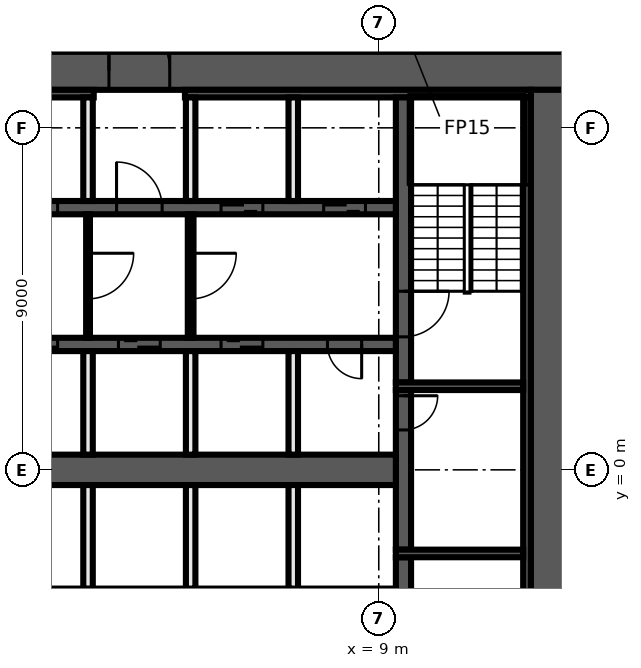
"""IFC4 building model, lengths in metres.
Left out: names, types, materials, properties, quantities, classifications, styles, units other than length and angle.
Written with IfcOpenShell. Run it as: python <this file> out.ifc"""

import sys

from ifc_helpers import new_model, si_unit, direction, frame, frame_2d, origin, place, context, subcontext, project, spatial, rectangle, extrude, element, fill, save


model = new_model("IFC4")
c1 = context("Model", 3, precision=1e-05, world=origin(), true_north=direction((0.0, 1.0)))
c2 = subcontext(c1, "Body", "Model", "MODEL_VIEW")
j1 = project(units=[si_unit("LENGTHUNIT", "METRE"), si_unit("PLANEANGLEUNIT", "RADIAN")], contexts=[c1])
p1 = place(None, origin())
s1 = spatial("IfcSite", under=j1, at=p1, CompositionType="ELEMENT")
p2 = place(p1, origin())
s2 = spatial("IfcBuilding", under=s1, at=p2, CompositionType="ELEMENT")
p3 = place(p2, frame((0.0, 0.0, 124.8)))
s3 = spatial("IfcBuildingStorey", under=s2, at=p3, CompositionType="ELEMENT", Elevation=124.8)
for number, where, z_axis, x_axis in (
    (1, (3.6, 11.0, 0.0), (0.0, 0.0, 1.0), (0.0, 1.0, 0.0)),
    (2, (1.8, 11.0, 0.0), (0.0, 0.0, 1.0), (0.0, 1.0, 0.0)),
):
    element("IfcWall", number, at=place(p3, frame(where, z_axis=z_axis, x_axis=x_axis)), inside=s3, PredefinedType="PARTITIONING", context=c2, shape_type="SweptSolid", body=[
        extrude(rectangle(XDim=1.175, YDim=0.15, at=frame_2d((0.587, 0.0))), origin(), (0.0, 0.0, 1.0), 3.3),
    ])
p4 = place(p3, frame((-14.0, 10.5, 0.0), z_axis=(0.0, 0.0, 1.0), x_axis=(1.0, 0.0, 0.0)))
e3 = element("IfcWall", 3, at=p4, inside=s3, PredefinedType="SHEAR", context=c2, shape_type="SweptSolid", body=[
    extrude(rectangle(XDim=28.0, YDim=1.0, at=frame_2d((14.0, 0.0))), origin(), (0.0, 0.0, 1.0), 3.3),
])
p5 = place(p4, frame((15.9, 0.0, 0.0)))
e4 = element("IfcOpeningElement", 4, at=p5, cuts=e3, PredefinedType="OPENING", context=c2, shape_type="SweptSolid", body=[
    extrude(rectangle(XDim=1.6, YDim=2.1, at=frame_2d((0.8, 1.05))), frame((0.0, 0.51, 0.0), z_axis=(0.0, -1.0, 0.0), x_axis=(1.0, 0.0, 0.0)), (0.0, 0.0, 1.0), 1.02),
])
p6 = place(p3, frame((13.5, 10.0, 0.0), z_axis=(0.0, 0.0, 1.0), x_axis=(0.0, -1.0, 0.0)))
e5 = element("IfcWall", 5, at=p6, inside=s3, PredefinedType="SHEAR", context=c2, shape_type="SweptSolid", body=[
    extrude(rectangle(XDim=20.0, YDim=1.0, at=frame_2d((10.0, 0.0))), origin(), (0.0, 0.0, 1.0), 3.3),
])
p7 = place(p3, frame((-13.0, 9.9, 0.0), z_axis=(0.0, 0.0, 1.0), x_axis=(1.0, 0.0, 0.0)))
e6 = element("IfcWall", 6, at=p7, inside=s3, PredefinedType="SHEAR", context=c2, shape_type="SweptSolid", body=[
    extrude(rectangle(XDim=14.5, YDim=0.2, at=frame_2d((7.25, 0.0))), origin(), (0.0, 0.0, 1.0), 3.3),
])
p8 = place(p3, frame((3.9, 9.9, 0.0), z_axis=(0.0, 0.0, 1.0), x_axis=(1.0, 0.0, 0.0)))
e7 = element("IfcWall", 7, at=p8, inside=s3, PredefinedType="SHEAR", context=c2, shape_type="SweptSolid", body=[
    extrude(rectangle(XDim=9.1, YDim=0.2, at=frame_2d((4.55, 0.0))), origin(), (0.0, 0.0, 1.0), 3.3),
])
p9 = place(p3, frame((12.9, 9.8, 0.0), z_axis=(0.0, 0.0, 1.0), x_axis=(0.0, -1.0, 0.0)))
e8 = element("IfcWall", 8, at=p9, inside=s3, PredefinedType="SHEAR", context=c2, shape_type="SweptSolid", body=[
    extrude(rectangle(XDim=19.6, YDim=0.2, at=frame_2d((9.8, 0.0))), origin(), (0.0, 0.0, 1.0), 3.3),
])
p10 = place(p3, frame((9.65, -2.3, 0.0), z_axis=(0.0, 0.0, 1.0), x_axis=(0.0, -1.0, 0.0)))
e9 = element("IfcWall", 9, at=p10, inside=s3, PredefinedType="SHEAR", context=c2, shape_type="SweptSolid", body=[
    extrude(rectangle(XDim=7.5, YDim=0.4, at=frame_2d((3.75, 0.0))), origin(), (0.0, 0.0, 1.0), 3.3),
])
p11 = place(p10, frame((1.2, 0.0, 0.0)))
e10 = element("IfcOpeningElement", 10, at=p11, cuts=e9, PredefinedType="OPENING", context=c2, shape_type="SweptSolid", body=[
    extrude(rectangle(XDim=1.2, YDim=2.1, at=frame_2d((0.6, 1.05))), frame((0.0, 0.21, 0.0), z_axis=(0.0, -1.0, 0.0), x_axis=(1.0, 0.0, 0.0)), (0.0, 0.0, 1.0), 0.42),
])
p12 = place(p3, frame((9.65, 2.1, 0.0), z_axis=(0.0, 0.0, 1.0), x_axis=(0.0, -1.0, 0.0)))
e11 = element("IfcWall", 11, at=p12, inside=s3, PredefinedType="SHEAR", context=c2, shape_type="SweptSolid", body=[
    extrude(rectangle(XDim=4.2, YDim=0.4, at=frame_2d((2.1, 0.0))), origin(), (0.0, 0.0, 1.0), 3.3),
])
p13 = place(p12, frame((0.15, 0.0, 0.0)))
e12 = element("IfcOpeningElement", 12, at=p13, cuts=e11, PredefinedType="OPENING", context=c2, shape_type="SweptSolid", body=[
    extrude(rectangle(XDim=0.9, YDim=2.1, at=frame_2d((0.45, 1.05))), frame((0.0, 0.21, 0.0), z_axis=(0.0, -1.0, 0.0), x_axis=(1.0, 0.0, 0.0)), (0.0, 0.0, 1.0), 0.42),
])
p14 = place(p3, frame((9.65, 9.8, 0.0), z_axis=(0.0, 0.0, 1.0), x_axis=(0.0, -1.0, 0.0)))
e13 = element("IfcWall", 13, at=p14, inside=s3, PredefinedType="SHEAR", context=c2, shape_type="SweptSolid", body=[
    extrude(rectangle(XDim=7.5, YDim=0.4, at=frame_2d((3.75, 0.0))), origin(), (0.0, 0.0, 1.0), 3.3),
])
p15 = place(p14, frame((5.1, 0.0, 0.0)))
e14 = element("IfcOpeningElement", 14, at=p15, cuts=e13, PredefinedType="OPENING", context=c2, shape_type="SweptSolid", body=[
    extrude(rectangle(XDim=1.2, YDim=2.1, at=frame_2d((0.6, 1.05))), frame((0.0, 0.21, 0.0), z_axis=(0.0, -1.0, 0.0), x_axis=(1.0, 0.0, 0.0)), (0.0, 0.0, 1.0), 0.42),
])
for number, where, z_axis, x_axis in (
    (15, (9.45, 2.2, 0.0), (0.0, 0.0, 1.0), (1.0, 0.0, 0.0)),
    (16, (9.45, -2.2, 0.0), (0.0, 0.0, 1.0), (1.0, 0.0, 0.0)),
):
    element("IfcWall", number, at=place(p3, frame(where, z_axis=z_axis, x_axis=x_axis)), inside=s3, PredefinedType="SHEAR", context=c2, shape_type="SweptSolid", body=[
        extrude(rectangle(XDim=3.35, YDim=0.2, at=frame_2d((1.675, 0.0))), origin(), (0.0, 0.0, 1.0), 3.3),
    ])
p16 = place(p3, frame((-9.45, 6.9, 0.0), z_axis=(0.0, 0.0, 1.0), x_axis=(1.0, 0.0, 0.0)))
e17 = element("IfcWall", 17, at=p16, inside=s3, PredefinedType="SHEAR", context=c2, shape_type="SweptSolid", body=[
    extrude(rectangle(XDim=18.9, YDim=0.35, at=frame_2d((9.45, 0.0))), origin(), (0.0, 0.0, 1.0), 3.3),
])
p17 = place(p16, frame((0.8, 0.0, 0.0)))
e18 = element("IfcOpeningElement", 18, at=p17, cuts=e17, PredefinedType="OPENING", context=c2, shape_type="SweptSolid", body=[
    extrude(rectangle(XDim=1.1, YDim=2.1, at=frame_2d((0.55, 1.05))), frame((0.0, 0.185, 0.0), z_axis=(0.0, -1.0, 0.0), x_axis=(1.0, 0.0, 0.0)), (0.0, 0.0, 1.0), 0.37),
])
p18 = place(p16, frame((3.5, 0.0, 0.0)))
e19 = element("IfcOpeningElement", 19, at=p18, cuts=e17, PredefinedType="OPENING", context=c2, shape_type="SweptSolid", body=[
    extrude(rectangle(XDim=1.1, YDim=2.1, at=frame_2d((0.55, 1.05))), frame((0.0, 0.185, 0.0), z_axis=(0.0, -1.0, 0.0), x_axis=(1.0, 0.0, 0.0)), (0.0, 0.0, 1.0), 0.37),
])
p19 = place(p16, frame((6.2, 0.0, 0.0)))
e20 = element("IfcOpeningElement", 20, at=p19, cuts=e17, PredefinedType="OPENING", context=c2, shape_type="SweptSolid", body=[
    extrude(rectangle(XDim=1.1, YDim=2.1, at=frame_2d((0.55, 1.05))), frame((0.0, 0.185, 0.0), z_axis=(0.0, -1.0, 0.0), x_axis=(1.0, 0.0, 0.0)), (0.0, 0.0, 1.0), 0.37),
])
p20 = place(p16, frame((8.9, 0.0, 0.0)))
e21 = element("IfcOpeningElement", 21, at=p20, cuts=e17, PredefinedType="OPENING", context=c2, shape_type="SweptSolid", body=[
    extrude(rectangle(XDim=1.1, YDim=2.1, at=frame_2d((0.55, 1.05))), frame((0.0, 0.185, 0.0), z_axis=(0.0, -1.0, 0.0), x_axis=(1.0, 0.0, 0.0)), (0.0, 0.0, 1.0), 0.37),
])
p21 = place(p16, frame((11.55, 0.0, 0.0)))
e22 = element("IfcOpeningElement", 22, at=p21, cuts=e17, PredefinedType="OPENING", context=c2, shape_type="SweptSolid", body=[
    extrude(rectangle(XDim=1.2, YDim=2.1, at=frame_2d((0.6, 1.05))), frame((0.0, 0.185, 0.0), z_axis=(0.0, -1.0, 0.0), x_axis=(1.0, 0.0, 0.0)), (0.0, 0.0, 1.0), 0.37),
])
p22 = place(p16, frame((14.3, 0.0, 0.0)))
e23 = element("IfcOpeningElement", 23, at=p22, cuts=e17, PredefinedType="OPENING", context=c2, shape_type="SweptSolid", body=[
    extrude(rectangle(XDim=1.1, YDim=2.1, at=frame_2d((0.55, 1.05))), frame((0.0, 0.185, 0.0), z_axis=(0.0, -1.0, 0.0), x_axis=(1.0, 0.0, 0.0)), (0.0, 0.0, 1.0), 0.37),
])
p23 = place(p16, frame((17.0, 0.0, 0.0)))
e24 = element("IfcOpeningElement", 24, at=p23, cuts=e17, PredefinedType="OPENING", context=c2, shape_type="SweptSolid", body=[
    extrude(rectangle(XDim=1.1, YDim=2.1, at=frame_2d((0.55, 1.05))), frame((0.0, 0.185, 0.0), z_axis=(0.0, -1.0, 0.0), x_axis=(1.0, 0.0, 0.0)), (0.0, 0.0, 1.0), 0.37),
])
p24 = place(p3, frame((9.45, 3.3, 0.0), z_axis=(0.0, 0.0, 1.0), x_axis=(-1.0, 0.0, 0.0)))
e25 = element("IfcWall", 25, at=p24, inside=s3, PredefinedType="SHEAR", context=c2, shape_type="SweptSolid", body=[
    extrude(rectangle(XDim=18.9, YDim=0.35, at=frame_2d((9.45, 0.0))), origin(), (0.0, 0.0, 1.0), 3.3),
])
p25 = place(p24, frame((17.0, 0.0, 0.0)))
e26 = element("IfcOpeningElement", 26, at=p25, cuts=e25, PredefinedType="OPENING", context=c2, shape_type="SweptSolid", body=[
    extrude(rectangle(XDim=1.1, YDim=2.1, at=frame_2d((0.55, 1.05))), frame((0.0, 0.185, 0.0), z_axis=(0.0, -1.0, 0.0), x_axis=(1.0, 0.0, 0.0)), (0.0, 0.0, 1.0), 0.37),
])
p26 = place(p24, frame((14.3, 0.0, 0.0)))
e27 = element("IfcOpeningElement", 27, at=p26, cuts=e25, PredefinedType="OPENING", context=c2, shape_type="SweptSolid", body=[
    extrude(rectangle(XDim=1.1, YDim=2.1, at=frame_2d((0.55, 1.05))), frame((0.0, 0.185, 0.0), z_axis=(0.0, -1.0, 0.0), x_axis=(1.0, 0.0, 0.0)), (0.0, 0.0, 1.0), 0.37),
])
p27 = place(p24, frame((11.6, 0.0, 0.0)))
e28 = element("IfcOpeningElement", 28, at=p27, cuts=e25, PredefinedType="OPENING", context=c2, shape_type="SweptSolid", body=[
    extrude(rectangle(XDim=1.1, YDim=2.1, at=frame_2d((0.55, 1.05))), frame((0.0, 0.185, 0.0), z_axis=(0.0, -1.0, 0.0), x_axis=(1.0, 0.0, 0.0)), (0.0, 0.0, 1.0), 0.37),
])
p28 = place(p24, frame((8.9, 0.0, 0.0)))
e29 = element("IfcOpeningElement", 29, at=p28, cuts=e25, PredefinedType="OPENING", context=c2, shape_type="SweptSolid", body=[
    extrude(rectangle(XDim=1.1, YDim=2.1, at=frame_2d((0.55, 1.05))), frame((0.0, 0.185, 0.0), z_axis=(0.0, -1.0, 0.0), x_axis=(1.0, 0.0, 0.0)), (0.0, 0.0, 1.0), 0.37),
])
p29 = place(p24, frame((6.2, 0.0, 0.0)))
e30 = element("IfcOpeningElement", 30, at=p29, cuts=e25, PredefinedType="OPENING", context=c2, shape_type="SweptSolid", body=[
    extrude(rectangle(XDim=1.1, YDim=2.1, at=frame_2d((0.55, 1.05))), frame((0.0, 0.185, 0.0), z_axis=(0.0, -1.0, 0.0), x_axis=(1.0, 0.0, 0.0)), (0.0, 0.0, 1.0), 0.37),
])
p30 = place(p24, frame((3.5, 0.0, 0.0)))
e31 = element("IfcOpeningElement", 31, at=p30, cuts=e25, PredefinedType="OPENING", context=c2, shape_type="SweptSolid", body=[
    extrude(rectangle(XDim=1.1, YDim=2.1, at=frame_2d((0.55, 1.05))), frame((0.0, 0.185, 0.0), z_axis=(0.0, -1.0, 0.0), x_axis=(1.0, 0.0, 0.0)), (0.0, 0.0, 1.0), 0.37),
])
p31 = place(p24, frame((0.9, 0.0, 0.0)))
e32 = element("IfcOpeningElement", 32, at=p31, cuts=e25, PredefinedType="OPENING", context=c2, shape_type="SweptSolid", body=[
    extrude(rectangle(XDim=0.9, YDim=2.1, at=frame_2d((0.45, 1.05))), frame((0.0, 0.185, 0.0), z_axis=(0.0, -1.0, 0.0), x_axis=(1.0, 0.0, 0.0)), (0.0, 0.0, 1.0), 0.37),
])
p32 = place(p3, frame((-9.45, 0.0, 0.0), z_axis=(0.0, 0.0, 1.0), x_axis=(1.0, 0.0, 0.0)))
e33 = element("IfcWall", 33, at=p32, inside=s3, PredefinedType="SHEAR", context=c2, shape_type="SweptSolid", body=[
    extrude(rectangle(XDim=18.9, YDim=0.8, at=frame_2d((9.45, 0.0))), origin(), (0.0, 0.0, 1.0), 3.3),
])
for number, where, z_axis, x_axis in (
    (34, (6.75, -3.125, 0.0), (0.0, 0.0, 1.0), (0.0, 1.0, 0.0)),
    (35, (6.75, 0.4, 0.0), (0.0, 0.0, 1.0), (0.0, 1.0, 0.0)),
    (36, (6.75, 7.075, 0.0), (0.0, 0.0, 1.0), (0.0, 1.0, 0.0)),
):
    element("IfcWall", number, at=place(p3, frame(where, z_axis=z_axis, x_axis=x_axis)), inside=s3, PredefinedType="SOLIDWALL", context=c2, shape_type="SweptSolid", body=[
        extrude(rectangle(XDim=2.725, YDim=0.25, at=frame_2d((1.363, 0.0))), origin(), (0.0, 0.0, 1.0), 3.3),
    ])
p33 = place(p3, frame((4.05, 6.725, 0.0), z_axis=(0.0, 0.0, 1.0), x_axis=(0.0, -1.0, 0.0)))
e37 = element("IfcWall", 37, at=p33, inside=s3, PredefinedType="PARTITIONING", context=c2, shape_type="SweptSolid", body=[
    extrude(rectangle(XDim=3.25, YDim=0.15, at=frame_2d((1.625, 0.0))), origin(), (0.0, 0.0, 1.0), 3.3),
])
p34 = place(p33, frame((1.025, 0.0, 0.0)))
e38 = element("IfcOpeningElement", 38, at=p34, cuts=e37, PredefinedType="OPENING", context=c2, shape_type="SweptSolid", body=[
    extrude(rectangle(XDim=1.2, YDim=2.1, at=frame_2d((0.6, 1.05))), frame((0.0, 0.085, 0.0), z_axis=(0.0, -1.0, 0.0), x_axis=(1.0, 0.0, 0.0)), (0.0, 0.0, 1.0), 0.17),
])
for number, where, z_axis, x_axis in (
    (39, (4.05, -3.125, 0.0), (0.0, 0.0, 1.0), (0.0, 1.0, 0.0)),
    (40, (4.05, 0.4, 0.0), (0.0, 0.0, 1.0), (0.0, 1.0, 0.0)),
    (41, (4.05, 7.075, 0.0), (0.0, 0.0, 1.0), (0.0, 1.0, 0.0)),
):
    element("IfcWall", number, at=place(p3, frame(where, z_axis=z_axis, x_axis=x_axis)), inside=s3, PredefinedType="SOLIDWALL", context=c2, shape_type="SweptSolid", body=[
        extrude(rectangle(XDim=2.725, YDim=0.25, at=frame_2d((1.363, 0.0))), origin(), (0.0, 0.0, 1.0), 3.3),
    ])
p35 = place(p3, frame((1.35, 6.725, 0.0), z_axis=(0.0, 0.0, 1.0), x_axis=(0.0, -1.0, 0.0)))
e42 = element("IfcWall", 42, at=p35, inside=s3, PredefinedType="PARTITIONING", context=c2, shape_type="SweptSolid", body=[
    extrude(rectangle(XDim=3.25, YDim=0.1, at=frame_2d((1.625, 0.0))), origin(), (0.0, 0.0, 1.0), 3.3),
])
p36 = place(p35, frame((1.025, 0.0, 0.0)))
e43 = element("IfcOpeningElement", 43, at=p36, cuts=e42, PredefinedType="OPENING", context=c2, shape_type="SweptSolid", body=[
    extrude(rectangle(XDim=1.2, YDim=2.1, at=frame_2d((0.6, 1.05))), frame((0.0, 0.06, 0.0), z_axis=(0.0, -1.0, 0.0), x_axis=(1.0, 0.0, 0.0)), (0.0, 0.0, 1.0), 0.12),
])
for number, where, z_axis, x_axis in (
    (44, (1.35, -3.125, 0.0), (0.0, 0.0, 1.0), (0.0, 1.0, 0.0)),
    (45, (1.35, 0.4, 0.0), (0.0, 0.0, 1.0), (0.0, 1.0, 0.0)),
    (46, (1.35, 7.075, 0.0), (0.0, 0.0, 1.0), (0.0, 1.0, 0.0)),
):
    element("IfcWall", number, at=place(p3, frame(where, z_axis=z_axis, x_axis=x_axis)), inside=s3, PredefinedType="SOLIDWALL", context=c2, shape_type="SweptSolid", body=[
        extrude(rectangle(XDim=2.725, YDim=0.25, at=frame_2d((1.363, 0.0))), origin(), (0.0, 0.0, 1.0), 3.3),
    ])
p37 = place(p13, origin())
e47 = element("IfcDoor", 47, at=p37, inside=s3, OperationType="SINGLE_SWING_RIGHT", PredefinedType="DOOR", context=c2, shape_type="SweptSolid", body=[
    extrude(rectangle(XDim=0.9, YDim=2.1, at=frame_2d((0.45, 1.05))), frame((0.0, 0.025, 0.0), z_axis=(0.0, -1.0, 0.0), x_axis=(1.0, 0.0, 0.0)), (0.0, 0.0, 1.0), 0.05),
])
fill(e12, e47)
p38 = place(p20, origin())
e48 = element("IfcDoor", 48, at=p38, inside=s3, OperationType="DOUBLE_DOOR_SLIDING", PredefinedType="DOOR", context=c2, shape_type="SweptSolid", body=[
    extrude(rectangle(XDim=1.1, YDim=2.1, at=frame_2d((0.55, 1.05))), frame((0.0, 0.025, 0.0), z_axis=(0.0, -1.0, 0.0), x_axis=(1.0, 0.0, 0.0)), (0.0, 0.0, 1.0), 0.05),
])
fill(e21, e48)
p39 = place(p5, origin())
e49 = element("IfcDoor", 49, at=p39, inside=s3, OperationType="DOUBLE_DOOR_SINGLE_SWING", PredefinedType="DOOR", context=c2, shape_type="SweptSolid", body=[
    extrude(rectangle(XDim=1.6, YDim=2.1, at=frame_2d((0.8, 1.05))), frame((0.0, 0.025, 0.0), z_axis=(0.0, -1.0, 0.0), x_axis=(1.0, 0.0, 0.0)), (0.0, 0.0, 1.0), 0.05),
])
fill(e4, e49)
p40 = place(p21, origin())
e50 = element("IfcDoor", 50, at=p40, inside=s3, OperationType="SINGLE_SWING_LEFT", PredefinedType="DOOR", context=c2, shape_type="SweptSolid", body=[
    extrude(rectangle(XDim=1.2, YDim=2.1, at=frame_2d((0.6, 1.05))), frame((0.0, 0.025, 0.0), z_axis=(0.0, -1.0, 0.0), x_axis=(1.0, 0.0, 0.0)), (0.0, 0.0, 1.0), 0.05),
])
fill(e22, e50)
p41 = place(p22, origin())
e51 = element("IfcDoor", 51, at=p41, inside=s3, OperationType="DOUBLE_DOOR_SLIDING", PredefinedType="DOOR", context=c2, shape_type="SweptSolid", body=[
    extrude(rectangle(XDim=1.1, YDim=2.1, at=frame_2d((0.55, 1.05))), frame((0.0, 0.025, 0.0), z_axis=(0.0, -1.0, 0.0), x_axis=(1.0, 0.0, 0.0)), (0.0, 0.0, 1.0), 0.05),
])
fill(e23, e51)
p42 = place(p23, origin())
e52 = element("IfcDoor", 52, at=p42, inside=s3, OperationType="DOUBLE_DOOR_SLIDING", PredefinedType="DOOR", context=c2, shape_type="SweptSolid", body=[
    extrude(rectangle(XDim=1.1, YDim=2.1, at=frame_2d((0.55, 1.05))), frame((0.0, 0.025, 0.0), z_axis=(0.0, -1.0, 0.0), x_axis=(1.0, 0.0, 0.0)), (0.0, 0.0, 1.0), 0.05),
])
fill(e24, e52)
p43 = place(p28, origin())
e53 = element("IfcDoor", 53, at=p43, inside=s3, OperationType="DOUBLE_DOOR_SLIDING", PredefinedType="DOOR", context=c2, shape_type="SweptSolid", body=[
    extrude(rectangle(XDim=1.1, YDim=2.1, at=frame_2d((0.55, 1.05))), frame((0.0, 0.025, 0.0), z_axis=(0.0, -1.0, 0.0), x_axis=(1.0, 0.0, 0.0)), (0.0, 0.0, 1.0), 0.05),
])
fill(e29, e53)
p44 = place(p29, origin())
e54 = element("IfcDoor", 54, at=p44, inside=s3, OperationType="DOUBLE_DOOR_SLIDING", PredefinedType="DOOR", context=c2, shape_type="SweptSolid", body=[
    extrude(rectangle(XDim=1.1, YDim=2.1, at=frame_2d((0.55, 1.05))), frame((0.0, 0.025, 0.0), z_axis=(0.0, -1.0, 0.0), x_axis=(1.0, 0.0, 0.0)), (0.0, 0.0, 1.0), 0.05),
])
fill(e30, e54)
p45 = place(p30, origin())
e55 = element("IfcDoor", 55, at=p45, inside=s3, OperationType="DOUBLE_DOOR_SLIDING", PredefinedType="DOOR", context=c2, shape_type="SweptSolid", body=[
    extrude(rectangle(XDim=1.1, YDim=2.1, at=frame_2d((0.55, 1.05))), frame((0.0, 0.025, 0.0), z_axis=(0.0, -1.0, 0.0), x_axis=(1.0, 0.0, 0.0)), (0.0, 0.0, 1.0), 0.05),
])
fill(e31, e55)
p46 = place(p31, origin())
e56 = element("IfcDoor", 56, at=p46, inside=s3, OperationType="SINGLE_SWING_LEFT", PredefinedType="DOOR", context=c2, shape_type="SweptSolid", body=[
    extrude(rectangle(XDim=0.9, YDim=2.1, at=frame_2d((0.45, 1.05))), frame((0.0, 0.025, 0.0), z_axis=(0.0, -1.0, 0.0), x_axis=(1.0, 0.0, 0.0)), (0.0, 0.0, 1.0), 0.05),
])
fill(e32, e56)
p47 = place(p15, origin())
e57 = element("IfcDoor", 57, at=p47, inside=s3, OperationType="SINGLE_SWING_LEFT", PredefinedType="DOOR", context=c2, shape_type="SweptSolid", body=[
    extrude(rectangle(XDim=1.2, YDim=2.1, at=frame_2d((0.6, 1.05))), frame((0.0, 0.025, 0.0), z_axis=(0.0, -1.0, 0.0), x_axis=(1.0, 0.0, 0.0)), (0.0, 0.0, 1.0), 0.05),
])
fill(e14, e57)
p48 = place(p36, origin())
e58 = element("IfcDoor", 58, at=p48, inside=s3, OperationType="SINGLE_SWING_LEFT", PredefinedType="DOOR", context=c2, shape_type="SweptSolid", body=[
    extrude(rectangle(XDim=1.2, YDim=2.1, at=frame_2d((0.6, 1.05))), frame((0.0, 0.025, 0.0), z_axis=(0.0, -1.0, 0.0), x_axis=(1.0, 0.0, 0.0)), (0.0, 0.0, 1.0), 0.05),
])
fill(e43, e58)
p49 = place(p34, origin())
e59 = element("IfcDoor", 59, at=p49, inside=s3, OperationType="SINGLE_SWING_RIGHT", PredefinedType="DOOR", context=c2, shape_type="SweptSolid", body=[
    extrude(rectangle(XDim=1.2, YDim=2.1, at=frame_2d((0.6, 1.05))), frame((0.0, 0.025, 0.0), z_axis=(0.0, -1.0, 0.0), x_axis=(1.0, 0.0, 0.0)), (0.0, 0.0, 1.0), 0.05),
])
fill(e38, e59)
save(model, sys.argv[1])
